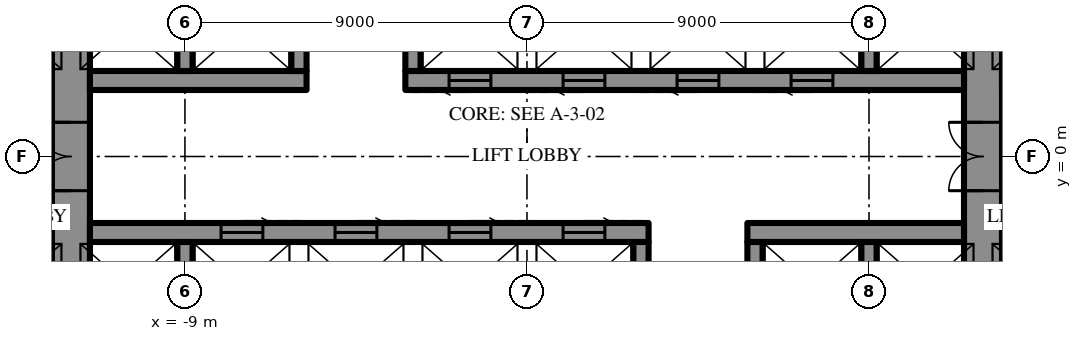
"""IFC4 building model, lengths in metres.
Left out: names, types, materials, properties, quantities, classifications, styles, units other than length and angle.
Written with IfcOpenShell. Run it as: python <this file> out.ifc"""

import sys

from ifc_helpers import new_model, si_unit, direction, frame, frame_2d, origin, place, context, subcontext, project, spatial, rectangle, extrude, element, fill, save


model = new_model("IFC4")
c1 = context("Model", 3, precision=1e-05, world=origin(), true_north=direction((0.0, 1.0)))
c2 = subcontext(c1, "Body", "Model", "MODEL_VIEW")
j1 = project(units=[si_unit("LENGTHUNIT", "METRE"), si_unit("PLANEANGLEUNIT", "RADIAN")], contexts=[c1])
p1 = place(None, origin())
s1 = spatial("IfcSite", under=j1, at=p1, CompositionType="ELEMENT")
p2 = place(p1, origin())
s2 = spatial("IfcBuilding", under=s1, at=p2, CompositionType="ELEMENT")
p3 = place(p2, frame((0.0, 0.0, 199.3)))
s3 = spatial("IfcBuildingStorey", under=s2, at=p3, CompositionType="ELEMENT", Elevation=199.3)
p4 = place(p3, frame((12.0, -10.7, 0.0), z_axis=(0.0, 0.0, 1.0), x_axis=(0.0, 1.0, 0.0)))
e1 = element("IfcWall", 1, at=p4, inside=s3, PredefinedType="SHEAR", context=c2, shape_type="SweptSolid", body=[
    extrude(rectangle(XDim=21.4, YDim=1.0, at=frame_2d((10.7, 0.0))), origin(), (0.0, 0.0, 1.0), 4.2),
])
p5 = place(p4, frame((9.8, 0.0, 0.0)))
e2 = element("IfcOpeningElement", 2, at=p5, cuts=e1, PredefinedType="OPENING", context=c2, shape_type="SweptSolid", body=[
    extrude(rectangle(XDim=1.8, YDim=2.4, at=frame_2d((0.9, 1.2))), frame((0.0, 0.51, 0.0), z_axis=(0.0, -1.0, 0.0), x_axis=(1.0, 0.0, 0.0)), (0.0, 0.0, 1.0), 1.02),
])
p6 = place(p3, frame((-12.0, -10.7, 0.0), z_axis=(0.0, 0.0, 1.0), x_axis=(0.0, 1.0, 0.0)))
e3 = element("IfcWall", 3, at=p6, inside=s3, PredefinedType="SHEAR", context=c2, shape_type="SweptSolid", body=[
    extrude(rectangle(XDim=21.4, YDim=1.0, at=frame_2d((10.7, 0.0))), origin(), (0.0, 0.0, 1.0), 4.2),
])
p7 = place(p6, frame((9.8, 0.0, 0.0)))
e4 = element("IfcOpeningElement", 4, at=p7, cuts=e3, PredefinedType="OPENING", context=c2, shape_type="SweptSolid", body=[
    extrude(rectangle(XDim=1.8, YDim=2.4, at=frame_2d((0.9, 1.2))), frame((0.0, 0.51, 0.0), z_axis=(0.0, -1.0, 0.0), x_axis=(1.0, 0.0, 0.0)), (0.0, 0.0, 1.0), 1.02),
])
p8 = place(p3, frame((-11.5, 2.0, 0.0), z_axis=(0.0, 0.0, 1.0), x_axis=(1.0, 0.0, 0.0)))
e5 = element("IfcWall", 5, at=p8, inside=s3, PredefinedType="SHEAR", context=c2, shape_type="SweptSolid", body=[
    extrude(rectangle(XDim=5.7, YDim=0.5, at=frame_2d((2.85, 0.0))), origin(), (0.0, 0.0, 1.0), 4.2),
])
p9 = place(p3, frame((-3.2, 2.0, 0.0), z_axis=(0.0, 0.0, 1.0), x_axis=(1.0, 0.0, 0.0)))
e6 = element("IfcWall", 6, at=p9, inside=s3, PredefinedType="SHEAR", context=c2, shape_type="SweptSolid", body=[
    extrude(rectangle(XDim=14.7, YDim=0.5, at=frame_2d((7.35, 0.0))), origin(), (0.0, 0.0, 1.0), 4.2),
])
p10 = place(p9, frame((1.15, 0.0, 0.0)))
e7 = element("IfcOpeningElement", 7, at=p10, cuts=e6, PredefinedType="OPENING", context=c2, shape_type="SweptSolid", body=[
    extrude(rectangle(XDim=1.1, YDim=2.2, at=frame_2d((0.55, 1.1))), frame((0.0, 0.26, 0.0), z_axis=(0.0, -1.0, 0.0), x_axis=(1.0, 0.0, 0.0)), (0.0, 0.0, 1.0), 0.52),
])
p11 = place(p9, frame((4.15, 0.0, 0.0)))
e8 = element("IfcOpeningElement", 8, at=p11, cuts=e6, PredefinedType="OPENING", context=c2, shape_type="SweptSolid", body=[
    extrude(rectangle(XDim=1.1, YDim=2.2, at=frame_2d((0.55, 1.1))), frame((0.0, 0.26, 0.0), z_axis=(0.0, -1.0, 0.0), x_axis=(1.0, 0.0, 0.0)), (0.0, 0.0, 1.0), 0.52),
])
p12 = place(p9, frame((7.15, 0.0, 0.0)))
e9 = element("IfcOpeningElement", 9, at=p12, cuts=e6, PredefinedType="OPENING", context=c2, shape_type="SweptSolid", body=[
    extrude(rectangle(XDim=1.1, YDim=2.2, at=frame_2d((0.55, 1.1))), frame((0.0, 0.26, 0.0), z_axis=(0.0, -1.0, 0.0), x_axis=(1.0, 0.0, 0.0)), (0.0, 0.0, 1.0), 0.52),
])
p13 = place(p9, frame((10.15, 0.0, 0.0)))
e10 = element("IfcOpeningElement", 10, at=p13, cuts=e6, PredefinedType="OPENING", context=c2, shape_type="SweptSolid", body=[
    extrude(rectangle(XDim=1.1, YDim=2.2, at=frame_2d((0.55, 1.1))), frame((0.0, 0.26, 0.0), z_axis=(0.0, -1.0, 0.0), x_axis=(1.0, 0.0, 0.0)), (0.0, 0.0, 1.0), 0.52),
])
for number, where, z_axis, x_axis in (
    (11, (-9.0, 2.25, 0.0), (0.0, 0.0, 1.0), (0.0, 1.0, 0.0)),
    (12, (-6.0, 2.25, 0.0), (0.0, 0.0, 1.0), (0.0, 1.0, 0.0)),
    (13, (-3.0, 2.25, 0.0), (0.0, 0.0, 1.0), (0.0, 1.0, 0.0)),
    (14, (9.0, 2.25, 0.0), (0.0, 0.0, 1.0), (0.0, 1.0, 0.0)),
):
    element("IfcWall", number, at=place(p3, frame(where, z_axis=z_axis, x_axis=x_axis)), inside=s3, PredefinedType="SHEAR", context=c2, shape_type="SweptSolid", body=[
        extrude(rectangle(XDim=2.3, YDim=0.4, at=frame_2d((1.15, 0.0))), origin(), (0.0, 0.0, 1.0), 4.2),
    ])
p14 = place(p3, frame((11.5, -2.0, 0.0), z_axis=(0.0, 0.0, 1.0), x_axis=(-1.0, 0.0, 0.0)))
e15 = element("IfcWall", 15, at=p14, inside=s3, PredefinedType="SHEAR", context=c2, shape_type="SweptSolid", body=[
    extrude(rectangle(XDim=5.7, YDim=0.5, at=frame_2d((2.85, 0.0))), origin(), (0.0, 0.0, 1.0), 4.2),
])
p15 = place(p3, frame((3.2, -2.0, 0.0), z_axis=(0.0, 0.0, 1.0), x_axis=(-1.0, 0.0, 0.0)))
e16 = element("IfcWall", 16, at=p15, inside=s3, PredefinedType="SHEAR", context=c2, shape_type="SweptSolid", body=[
    extrude(rectangle(XDim=14.7, YDim=0.5, at=frame_2d((7.35, 0.0))), origin(), (0.0, 0.0, 1.0), 4.2),
])
p16 = place(p15, frame((1.15, 0.0, 0.0)))
e17 = element("IfcOpeningElement", 17, at=p16, cuts=e16, PredefinedType="OPENING", context=c2, shape_type="SweptSolid", body=[
    extrude(rectangle(XDim=1.1, YDim=2.2, at=frame_2d((0.55, 1.1))), frame((0.0, 0.26, 0.0), z_axis=(0.0, -1.0, 0.0), x_axis=(1.0, 0.0, 0.0)), (0.0, 0.0, 1.0), 0.52),
])
p17 = place(p15, frame((4.15, 0.0, 0.0)))
e18 = element("IfcOpeningElement", 18, at=p17, cuts=e16, PredefinedType="OPENING", context=c2, shape_type="SweptSolid", body=[
    extrude(rectangle(XDim=1.1, YDim=2.2, at=frame_2d((0.55, 1.1))), frame((0.0, 0.26, 0.0), z_axis=(0.0, -1.0, 0.0), x_axis=(1.0, 0.0, 0.0)), (0.0, 0.0, 1.0), 0.52),
])
p18 = place(p15, frame((7.15, 0.0, 0.0)))
e19 = element("IfcOpeningElement", 19, at=p18, cuts=e16, PredefinedType="OPENING", context=c2, shape_type="SweptSolid", body=[
    extrude(rectangle(XDim=1.1, YDim=2.2, at=frame_2d((0.55, 1.1))), frame((0.0, 0.26, 0.0), z_axis=(0.0, -1.0, 0.0), x_axis=(1.0, 0.0, 0.0)), (0.0, 0.0, 1.0), 0.52),
])
p19 = place(p15, frame((10.15, 0.0, 0.0)))
e20 = element("IfcOpeningElement", 20, at=p19, cuts=e16, PredefinedType="OPENING", context=c2, shape_type="SweptSolid", body=[
    extrude(rectangle(XDim=1.1, YDim=2.2, at=frame_2d((0.55, 1.1))), frame((0.0, 0.26, 0.0), z_axis=(0.0, -1.0, 0.0), x_axis=(1.0, 0.0, 0.0)), (0.0, 0.0, 1.0), 0.52),
])
for number, where, z_axis, x_axis in (
    (21, (9.0, -2.25, 0.0), (0.0, 0.0, 1.0), (0.0, -1.0, 0.0)),
    (22, (6.0, -2.25, 0.0), (0.0, 0.0, 1.0), (0.0, -1.0, 0.0)),
    (23, (3.0, -2.25, 0.0), (0.0, 0.0, 1.0), (0.0, -1.0, 0.0)),
    (24, (-9.0, -2.25, 0.0), (0.0, 0.0, 1.0), (0.0, -1.0, 0.0)),
):
    element("IfcWall", number, at=place(p3, frame(where, z_axis=z_axis, x_axis=x_axis)), inside=s3, PredefinedType="SHEAR", context=c2, shape_type="SweptSolid", body=[
        extrude(rectangle(XDim=2.3, YDim=0.4, at=frame_2d((1.15, 0.0))), origin(), (0.0, 0.0, 1.0), 4.2),
    ])
p20 = place(p5, origin())
e25 = element("IfcDoor", 25, at=p20, inside=s3, OperationType="DOUBLE_DOOR_SINGLE_SWING", PredefinedType="DOOR", context=c2, shape_type="SweptSolid", body=[
    extrude(rectangle(XDim=1.8, YDim=2.4, at=frame_2d((0.9, 1.2))), frame((0.0, 0.025, 0.0), z_axis=(0.0, -1.0, 0.0), x_axis=(1.0, 0.0, 0.0)), (0.0, 0.0, 1.0), 0.05),
])
fill(e2, e25)
p21 = place(p7, origin())
e26 = element("IfcDoor", 26, at=p21, inside=s3, OperationType="DOUBLE_DOOR_SINGLE_SWING", PredefinedType="DOOR", context=c2, shape_type="SweptSolid", body=[
    extrude(rectangle(XDim=1.8, YDim=2.4, at=frame_2d((0.9, 1.2))), frame((0.0, 0.025, 0.0), z_axis=(0.0, -1.0, 0.0), x_axis=(1.0, 0.0, 0.0)), (0.0, 0.0, 1.0), 0.05),
])
fill(e4, e26)
p22 = place(p10, frame((1.1, 0.0, 0.0), z_axis=(0.0, 0.0, 1.0), x_axis=(-1.0, 0.0, 0.0)))
e27 = element("IfcDoor", 27, at=p22, inside=s3, OperationType="SLIDING_TO_LEFT", PredefinedType="DOOR", context=c2, shape_type="SweptSolid", body=[
    extrude(rectangle(XDim=1.1, YDim=2.2, at=frame_2d((0.55, 1.1))), frame((0.0, 0.025, 0.0), z_axis=(0.0, -1.0, 0.0), x_axis=(1.0, 0.0, 0.0)), (0.0, 0.0, 1.0), 0.05),
])
fill(e7, e27)
p23 = place(p11, frame((1.1, 0.0, 0.0), z_axis=(0.0, 0.0, 1.0), x_axis=(-1.0, 0.0, 0.0)))
e28 = element("IfcDoor", 28, at=p23, inside=s3, OperationType="SLIDING_TO_LEFT", PredefinedType="DOOR", context=c2, shape_type="SweptSolid", body=[
    extrude(rectangle(XDim=1.1, YDim=2.2, at=frame_2d((0.55, 1.1))), frame((0.0, 0.025, 0.0), z_axis=(0.0, -1.0, 0.0), x_axis=(1.0, 0.0, 0.0)), (0.0, 0.0, 1.0), 0.05),
])
fill(e8, e28)
p24 = place(p12, frame((1.1, 0.0, 0.0), z_axis=(0.0, 0.0, 1.0), x_axis=(-1.0, 0.0, 0.0)))
e29 = element("IfcDoor", 29, at=p24, inside=s3, OperationType="SLIDING_TO_LEFT", PredefinedType="DOOR", context=c2, shape_type="SweptSolid", body=[
    extrude(rectangle(XDim=1.1, YDim=2.2, at=frame_2d((0.55, 1.1))), frame((0.0, 0.025, 0.0), z_axis=(0.0, -1.0, 0.0), x_axis=(1.0, 0.0, 0.0)), (0.0, 0.0, 1.0), 0.05),
])
fill(e9, e29)
p25 = place(p13, frame((1.1, 0.0, 0.0), z_axis=(0.0, 0.0, 1.0), x_axis=(-1.0, 0.0, 0.0)))
e30 = element("IfcDoor", 30, at=p25, inside=s3, OperationType="SLIDING_TO_LEFT", PredefinedType="DOOR", context=c2, shape_type="SweptSolid", body=[
    extrude(rectangle(XDim=1.1, YDim=2.2, at=frame_2d((0.55, 1.1))), frame((0.0, 0.025, 0.0), z_axis=(0.0, -1.0, 0.0), x_axis=(1.0, 0.0, 0.0)), (0.0, 0.0, 1.0), 0.05),
])
fill(e10, e30)
p26 = place(p16, frame((1.1, 0.0, 0.0), z_axis=(0.0, 0.0, 1.0), x_axis=(-1.0, 0.0, 0.0)))
e31 = element("IfcDoor", 31, at=p26, inside=s3, OperationType="SLIDING_TO_LEFT", PredefinedType="DOOR", context=c2, shape_type="SweptSolid", body=[
    extrude(rectangle(XDim=1.1, YDim=2.2, at=frame_2d((0.55, 1.1))), frame((0.0, 0.025, 0.0), z_axis=(0.0, -1.0, 0.0), x_axis=(1.0, 0.0, 0.0)), (0.0, 0.0, 1.0), 0.05),
])
fill(e17, e31)
p27 = place(p17, frame((1.1, 0.0, 0.0), z_axis=(0.0, 0.0, 1.0), x_axis=(-1.0, 0.0, 0.0)))
e32 = element("IfcDoor", 32, at=p27, inside=s3, OperationType="SLIDING_TO_LEFT", PredefinedType="DOOR", context=c2, shape_type="SweptSolid", body=[
    extrude(rectangle(XDim=1.1, YDim=2.2, at=frame_2d((0.55, 1.1))), frame((0.0, 0.025, 0.0), z_axis=(0.0, -1.0, 0.0), x_axis=(1.0, 0.0, 0.0)), (0.0, 0.0, 1.0), 0.05),
])
fill(e18, e32)
p28 = place(p18, frame((1.1, 0.0, 0.0), z_axis=(0.0, 0.0, 1.0), x_axis=(-1.0, 0.0, 0.0)))
e33 = element("IfcDoor", 33, at=p28, inside=s3, OperationType="SLIDING_TO_LEFT", PredefinedType="DOOR", context=c2, shape_type="SweptSolid", body=[
    extrude(rectangle(XDim=1.1, YDim=2.2, at=frame_2d((0.55, 1.1))), frame((0.0, 0.025, 0.0), z_axis=(0.0, -1.0, 0.0), x_axis=(1.0, 0.0, 0.0)), (0.0, 0.0, 1.0), 0.05),
])
fill(e19, e33)
p29 = place(p19, frame((1.1, 0.0, 0.0), z_axis=(0.0, 0.0, 1.0), x_axis=(-1.0, 0.0, 0.0)))
e34 = element("IfcDoor", 34, at=p29, inside=s3, OperationType="SLIDING_TO_LEFT", PredefinedType="DOOR", context=c2, shape_type="SweptSolid", body=[
    extrude(rectangle(XDim=1.1, YDim=2.2, at=frame_2d((0.55, 1.1))), frame((0.0, 0.025, 0.0), z_axis=(0.0, -1.0, 0.0), x_axis=(1.0, 0.0, 0.0)), (0.0, 0.0, 1.0), 0.05),
])
fill(e20, e34)
save(model, sys.argv[1])
